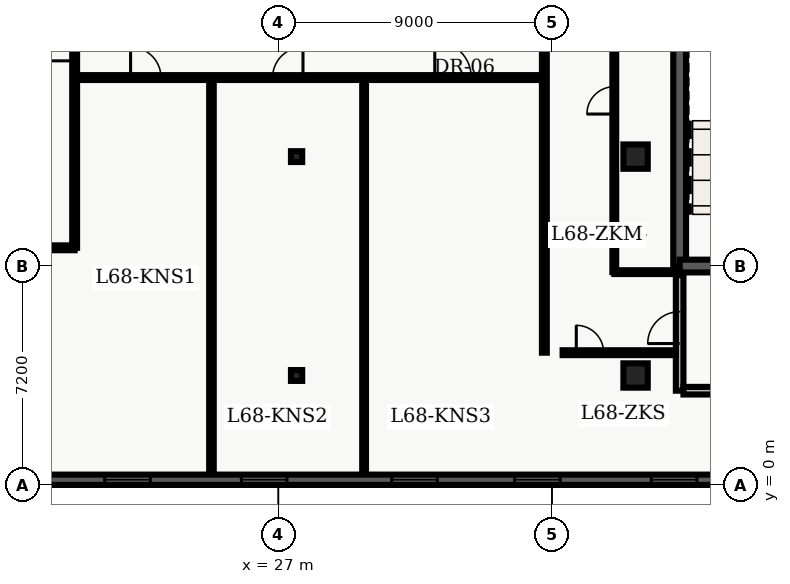
"""IFC4 building model, lengths in metres.
Left out: names, types, materials, properties, quantities, classifications, styles, units other than length and angle.
Written with IfcOpenShell. Run it as: python <this file> out.ifc"""

import sys

from ifc_helpers import new_model, entity, si_unit, converted_unit, direction, frame, origin_with_axes, origin_2d_with_axis, place, context, subcontext, project, spatial, polyline, rectangle, i_section, outline, extrude, element, fill, save


model = new_model("IFC4")
c1 = context("Model", 3, precision=1e-05, world=origin_with_axes(), true_north=direction((0.0, 1.0)))
c2 = subcontext(c1, "Body", "Model", "MODEL_VIEW")
j1 = project(units=[si_unit("LENGTHUNIT", "METRE"), converted_unit("PLANEANGLEUNIT", "DEGREE", entity("IfcPlaneAngleMeasure", 0.017), si_unit("PLANEANGLEUNIT", "RADIAN"), dimensions=[0, 0, 0, 0, 0, 0, 0])], contexts=[c1])
p1 = place(None, origin_with_axes())
s1 = spatial("IfcSite", under=j1, at=p1, CompositionType="ELEMENT")
p2 = place(p1, origin_with_axes())
s2 = spatial("IfcBuilding", under=s1, at=p2, CompositionType="ELEMENT")
p3 = place(p2, frame((0.0, 0.0, 276.3), z_axis=(0.0, 0.0, 1.0), x_axis=(1.0, 0.0, 0.0)))
s3 = spatial("IfcBuildingStorey", under=s2, at=p3, CompositionType="ELEMENT", Elevation=276.3)
p4 = place(p3, frame((40.2, 7.2, 0.0), z_axis=(0.0, 0.0, 1.0), x_axis=(0.0, 1.0, 0.0)))
e1 = element("IfcWall", 1, at=p4, inside=s3, PredefinedType="SHEAR", context=c2, shape_type="SweptSolid", body=[
    extrude(outline(polyline([(0.0, -0.21), (15.6, -0.21), (15.6, 0.21), (0.0, 0.21), (0.0, -0.21)])), origin_with_axes(), (0.0, 0.0, 1.0), 3.66),
])
p5 = place(p4, frame((12.75, 0.0, 0.0), z_axis=(0.0, 0.0, 1.0), x_axis=(1.0, 0.0, 0.0)))
e2 = element("IfcOpeningElement", 2, at=p5, cuts=e1, PredefinedType="OPENING", context=c2, shape_type="SweptSolid", body=[
    extrude(rectangle(XDim=1.2, YDim=0.44, at=origin_2d_with_axis()), origin_with_axes(), (0.0, 0.0, 1.0), 2.15),
])
p6 = place(p4, frame((9.3, 0.0, 0.0), z_axis=(0.0, 0.0, 1.0), x_axis=(1.0, 0.0, 0.0)))
e3 = element("IfcOpeningElement", 3, at=p6, cuts=e1, PredefinedType="OPENING", context=c2, shape_type="SweptSolid", body=[
    extrude(rectangle(XDim=0.9, YDim=0.44, at=origin_2d_with_axis()), origin_with_axes(), (0.0, 0.0, 1.0), 2.15),
])
p7 = place(p3, frame((40.2, 7.2, 0.0), z_axis=(0.0, 0.0, 1.0), x_axis=(1.0, 0.0, 0.0)))
e4 = element("IfcWall", 4, at=p7, inside=s3, PredefinedType="SHEAR", context=c2, shape_type="SweptSolid", body=[
    extrude(outline(polyline([(0.0, -0.21), (7.85, -0.21), (7.85, 0.21), (0.0, 0.21), (0.0, -0.21)])), origin_with_axes(), (0.0, 0.0, 1.0), 3.66),
])
p8 = place(p7, frame((2.175, 0.0, 0.0), z_axis=(0.0, 0.0, 1.0), x_axis=(1.0, 0.0, 0.0)))
e5 = element("IfcOpeningElement", 5, at=p8, cuts=e4, PredefinedType="OPENING", context=c2, shape_type="SweptSolid", body=[
    extrude(rectangle(XDim=1.05, YDim=0.44, at=origin_2d_with_axis()), origin_with_axes(), (0.0, 0.0, 1.0), 2.15),
])
p9 = place(p3, frame((40.2, 3.1, 0.0), z_axis=(0.0, 0.0, 1.0), x_axis=(0.0, 1.0, 0.0)))
e6 = element("IfcWall", 6, at=p9, inside=s3, PredefinedType="SOLIDWALL", context=c2, shape_type="SweptSolid", body=[
    extrude(outline(polyline([(0.0, -0.125), (3.8, -0.125), (3.8, 0.125), (0.0, 0.125), (0.0, -0.125)])), origin_with_axes(), (0.0, 0.0, 1.0), 2.7),
])
p10 = place(p9, frame((2.075, 0.0, 0.0), z_axis=(0.0, 0.0, 1.0), x_axis=(1.0, 0.0, 0.0)))
e7 = element("IfcOpeningElement", 7, at=p10, cuts=e6, PredefinedType="OPENING", context=c2, shape_type="SweptSolid", body=[
    extrude(rectangle(XDim=1.05, YDim=0.27, at=origin_2d_with_axis()), origin_with_axes(), (0.0, 0.0, 1.0), 2.15),
])
p11 = place(p3, frame((40.325, 3.1, 0.0), z_axis=(0.0, 0.0, 1.0), x_axis=(1.0, 0.0, 0.0)))
e8 = element("IfcWall", 8, at=p11, inside=s3, PredefinedType="SOLIDWALL", context=c2, shape_type="SweptSolid", body=[
    extrude(outline(polyline([(0.0, -0.125), (3.95, -0.125), (3.95, 0.125), (0.0, 0.125), (0.0, -0.125)])), origin_with_axes(), (0.0, 0.0, 1.0), 2.7),
])
for number, where, z_axis, x_axis in (
    (9, (27.6, 3.6, 0.0), (0.0, 0.0, 1.0), (1.0, 0.0, 0.0)),
    (10, (27.6, 10.8, 0.0), (0.0, 0.0, 1.0), (1.0, 0.0, 0.0)),
):
    element("IfcColumn", number, at=place(p3, frame(where, z_axis=z_axis, x_axis=x_axis)), inside=s3, PredefinedType="COLUMN", context=c2, shape_type="SweptSolid", body=[
        extrude(i_section(OverallWidth=0.369, OverallDepth=0.356, WebThickness=0.011, FlangeThickness=0.018, FilletRadius=0.018, at=origin_2d_with_axis()), origin_with_axes(), (0.0, 0.0, 1.0), 3.9),
    ])
for number, where, z_axis, x_axis in (
    (11, (38.75, 3.6, 0.0), (0.0, 0.0, 1.0), (1.0, 0.0, 0.0)),
    (12, (38.75, 10.8, 0.0), (0.0, 0.0, 1.0), (1.0, 0.0, 0.0)),
):
    element("IfcColumn", number, at=place(p3, frame(where, z_axis=z_axis, x_axis=x_axis)), inside=s3, PredefinedType="COLUMN", context=c2, shape_type="SweptSolid", body=[
        extrude(rectangle(XDim=0.8, YDim=0.8, at=origin_2d_with_axis()), origin_with_axes(), (0.0, 0.0, 1.0), 3.9),
    ])
p12 = place(p3, frame((8.135, 7.8, 0.0), z_axis=(0.0, 0.0, 1.0), x_axis=(1.0, 0.0, 0.0)))
e13 = element("IfcWall", 13, at=p12, inside=s3, PredefinedType="PARTITIONING", context=c2, shape_type="SweptSolid", body=[
    extrude(outline(polyline([(0.0, -0.08), (12.165, -0.08), (12.165, 0.08), (0.0, 0.08), (0.0, -0.08)])), origin_with_axes(), (0.0, 0.0, 1.0), 2.7),
])
p13 = place(p12, frame((6.065, 0.0, 0.0), z_axis=(0.0, 0.0, 1.0), x_axis=(1.0, 0.0, 0.0)))
e14 = element("IfcOpeningElement", 14, at=p13, cuts=e13, PredefinedType="OPENING", context=c2, shape_type="SweptSolid", body=[
    extrude(rectangle(XDim=1.0, YDim=0.18, at=origin_2d_with_axis()), origin_with_axes(), (0.0, 0.0, 1.0), 2.15),
])
p14 = place(p3, frame((20.3, 7.8, 0.0), z_axis=(0.0, 0.0, 1.0), x_axis=(0.0, 1.0, 0.0)))
e15 = element("IfcWall", 15, at=p14, inside=s3, PredefinedType="PARTITIONING", context=c2, shape_type="SweptSolid", body=[
    extrude(outline(polyline([(0.0, -0.08), (32.7, -0.08), (32.7, 0.08), (0.0, 0.08), (0.0, -0.08)])), origin_with_axes(), (0.0, 0.0, 1.0), 2.7),
])
p15 = place(p14, frame((14.392, 0.0, 0.0), z_axis=(0.0, 0.0, 1.0), x_axis=(1.0, 0.0, 0.0)))
e16 = element("IfcOpeningElement", 16, at=p15, cuts=e15, PredefinedType="OPENING", context=c2, shape_type="SweptSolid", body=[
    extrude(rectangle(XDim=1.0, YDim=0.18, at=origin_2d_with_axis()), origin_with_axes(), (0.0, 0.0, 1.0), 2.15),
])
p16 = place(p14, frame((18.846, 0.0, 0.0), z_axis=(0.0, 0.0, 1.0), x_axis=(1.0, 0.0, 0.0)))
e17 = element("IfcOpeningElement", 17, at=p16, cuts=e15, PredefinedType="OPENING", context=c2, shape_type="SweptSolid", body=[
    extrude(rectangle(XDim=1.0, YDim=0.18, at=origin_2d_with_axis()), origin_with_axes(), (0.0, 0.0, 1.0), 2.15),
])
p17 = place(p14, frame((23.952, 0.0, 0.0), z_axis=(0.0, 0.0, 1.0), x_axis=(1.0, 0.0, 0.0)))
e18 = element("IfcOpeningElement", 18, at=p17, cuts=e15, PredefinedType="OPENING", context=c2, shape_type="SweptSolid", body=[
    extrude(rectangle(XDim=1.0, YDim=0.18, at=origin_2d_with_axis()), origin_with_axes(), (0.0, 0.0, 1.0), 2.15),
])
p18 = place(p14, frame((27.114, 0.0, 0.0), z_axis=(0.0, 0.0, 1.0), x_axis=(1.0, 0.0, 0.0)))
e19 = element("IfcOpeningElement", 19, at=p18, cuts=e15, PredefinedType="OPENING", context=c2, shape_type="SweptSolid", body=[
    extrude(rectangle(XDim=1.0, YDim=0.18, at=origin_2d_with_axis()), origin_with_axes(), (0.0, 0.0, 1.0), 2.15),
])
p19 = place(p14, frame((6.675, 0.0, 0.0), z_axis=(0.0, 0.0, 1.0), x_axis=(1.0, 0.0, 0.0)))
e20 = element("IfcOpeningElement", 20, at=p19, cuts=e15, PredefinedType="OPENING", context=c2, shape_type="SweptSolid", body=[
    extrude(rectangle(XDim=1.05, YDim=0.18, at=origin_2d_with_axis()), origin_with_axes(), (0.0, 0.0, 1.0), 2.15),
])
p20 = place(p3, frame((20.3, 13.4, 0.0), z_axis=(0.0, 0.0, 1.0), x_axis=(1.0, 0.0, 0.0)))
e21 = element("IfcWall", 21, at=p20, inside=s3, PredefinedType="PARTITIONING", context=c2, shape_type="SweptSolid", body=[
    extrude(outline(polyline([(0.0, -0.08), (15.45, -0.08), (15.45, 0.08), (0.0, 0.08), (0.0, -0.08)])), origin_with_axes(), (0.0, 0.0, 1.0), 2.7),
])
p21 = place(p20, frame((2.34, 0.0, 0.0), z_axis=(0.0, 0.0, 1.0), x_axis=(1.0, 0.0, 0.0)))
e22 = element("IfcOpeningElement", 22, at=p21, cuts=e21, PredefinedType="OPENING", context=c2, shape_type="SweptSolid", body=[
    extrude(rectangle(XDim=1.0, YDim=0.18, at=origin_2d_with_axis()), origin_with_axes(), (0.0, 0.0, 1.0), 2.15),
])
p22 = place(p20, frame((7.011, 0.0, 0.0), z_axis=(0.0, 0.0, 1.0), x_axis=(1.0, 0.0, 0.0)))
e23 = element("IfcOpeningElement", 23, at=p22, cuts=e21, PredefinedType="OPENING", context=c2, shape_type="SweptSolid", body=[
    extrude(rectangle(XDim=1.0, YDim=0.18, at=origin_2d_with_axis()), origin_with_axes(), (0.0, 0.0, 1.0), 2.15),
])
p23 = place(p20, frame((12.445, 0.0, 0.0), z_axis=(0.0, 0.0, 1.0), x_axis=(1.0, 0.0, 0.0)))
e24 = element("IfcOpeningElement", 24, at=p23, cuts=e21, PredefinedType="OPENING", context=c2, shape_type="SweptSolid", body=[
    extrude(rectangle(XDim=1.2, YDim=0.18, at=origin_2d_with_axis()), origin_with_axes(), (0.0, 0.0, 1.0), 2.2),
])
p24 = place(p3, frame((35.75, 4.35, 0.0), z_axis=(0.0, 0.0, 1.0), x_axis=(0.0, 1.0, 0.0)))
e25 = element("IfcWall", 25, at=p24, inside=s3, PredefinedType="PARTITIONING", context=c2, shape_type="SweptSolid", body=[
    extrude(outline(polyline([(0.0, -0.08), (16.95, -0.08), (16.95, 0.08), (0.0, 0.08), (0.0, -0.08)])), origin_with_axes(), (0.0, 0.0, 1.0), 2.7),
])
p25 = place(p3, frame((24.8, 0.335, 0.0), z_axis=(0.0, 0.0, 1.0), x_axis=(0.0, 1.0, 0.0)))
e26 = element("IfcWall", 26, at=p25, inside=s3, PredefinedType="PARTITIONING", context=c2, shape_type="SweptSolid", body=[
    extrude(outline(polyline([(0.0, -0.075), (12.945, -0.075), (12.945, 0.075), (0.0, 0.075), (0.0, -0.075)])), origin_with_axes(), (0.0, 0.0, 1.0), 2.7),
])
p26 = place(p3, frame((29.821, 0.335, 0.0), z_axis=(0.0, 0.0, 1.0), x_axis=(0.0, 1.0, 0.0)))
e27 = element("IfcWall", 27, at=p26, inside=s3, PredefinedType="PARTITIONING", context=c2, shape_type="SweptSolid", body=[
    extrude(outline(polyline([(0.0, -0.062), (12.945, -0.062), (12.945, 0.062), (0.0, 0.062), (0.0, -0.062)])), origin_with_axes(), (0.0, 0.0, 1.0), 2.7),
])
p27 = place(p3, frame((36.35, 4.35, 0.0), z_axis=(0.0, 0.0, 1.0), x_axis=(1.0, 0.0, 0.0)))
e28 = element("IfcWall", 28, at=p27, inside=s3, PredefinedType="PARTITIONING", context=c2, shape_type="SweptSolid", body=[
    extrude(outline(polyline([(0.0, -0.08), (3.725, -0.08), (3.725, 0.08), (0.0, 0.08), (0.0, -0.08)])), origin_with_axes(), (0.0, 0.0, 1.0), 2.7),
])
p28 = place(p27, frame((0.9, 0.0, 0.0), z_axis=(0.0, 0.0, 1.0), x_axis=(1.0, 0.0, 0.0)))
e29 = element("IfcOpeningElement", 29, at=p28, cuts=e28, PredefinedType="OPENING", context=c2, shape_type="SweptSolid", body=[
    extrude(rectangle(XDim=0.9, YDim=0.18, at=origin_2d_with_axis()), origin_with_axes(), (0.0, 0.0, 1.0), 2.15),
])
p29 = place(p3, frame((38.05, 7.0, 0.0), z_axis=(0.0, 0.0, 1.0), x_axis=(1.0, 0.0, 0.0)))
e30 = element("IfcWall", 30, at=p29, inside=s3, PredefinedType="PARTITIONING", context=c2, shape_type="SweptSolid", body=[
    extrude(outline(polyline([(0.0, -0.062), (2.15, -0.062), (2.15, 0.062), (0.0, 0.062), (0.0, -0.062)])), origin_with_axes(), (0.0, 0.0, 1.0), 2.7),
])
p30 = place(p3, frame((38.05, 7.0, 0.0), z_axis=(0.0, 0.0, 1.0), x_axis=(0.0, 1.0, 0.0)))
e31 = element("IfcWall", 31, at=p30, inside=s3, PredefinedType="PARTITIONING", context=c2, shape_type="SweptSolid", body=[
    extrude(outline(polyline([(0.0, -0.062), (7.95, -0.062), (7.95, 0.062), (0.0, 0.062), (0.0, -0.062)])), origin_with_axes(), (0.0, 0.0, 1.0), 2.7),
])
p31 = place(p30, frame((5.65, 0.0, 0.0), z_axis=(0.0, 0.0, 1.0), x_axis=(1.0, 0.0, 0.0)))
e32 = element("IfcOpeningElement", 32, at=p31, cuts=e31, PredefinedType="OPENING", context=c2, shape_type="SweptSolid", body=[
    extrude(rectangle(XDim=0.9, YDim=0.145, at=origin_2d_with_axis()), origin_with_axes(), (0.0, 0.0, 1.0), 2.15),
])
p32 = place(p3, frame((47.36, 0.17, 0.0), z_axis=(0.0, 0.0, 1.0), x_axis=(-1.0, 0.0, 0.0)))
e33 = element("IfcWall", 33, at=p32, inside=s3, PredefinedType="SOLIDWALL", context=c2, shape_type="SweptSolid", body=[
    extrude(outline(polyline([(0.0, -0.17), (37.16, -0.17), (37.16, 0.17), (0.0, 0.17), (0.0, -0.17)])), origin_with_axes(), (0.0, 0.0, 1.0), 3.66),
])
p33 = place(p32, frame((2.847, 0.0, 0.45), z_axis=(0.0, 0.0, 1.0), x_axis=(1.0, 0.0, 0.0)))
e34 = element("IfcOpeningElement", 34, at=p33, cuts=e33, PredefinedType="OPENING", context=c2, shape_type="SweptSolid", body=[
    extrude(rectangle(XDim=1.5, YDim=0.36, at=origin_2d_with_axis()), origin_with_axes(), (0.0, 0.0, 1.0), 2.1),
])
p34 = place(p32, frame((7.342, 0.0, 0.45), z_axis=(0.0, 0.0, 1.0), x_axis=(1.0, 0.0, 0.0)))
e35 = element("IfcOpeningElement", 35, at=p34, cuts=e33, PredefinedType="OPENING", context=c2, shape_type="SweptSolid", body=[
    extrude(rectangle(XDim=1.5, YDim=0.36, at=origin_2d_with_axis()), origin_with_axes(), (0.0, 0.0, 1.0), 2.1),
])
p35 = place(p32, frame((11.837, 0.0, 0.45), z_axis=(0.0, 0.0, 1.0), x_axis=(1.0, 0.0, 0.0)))
e36 = element("IfcOpeningElement", 36, at=p35, cuts=e33, PredefinedType="OPENING", context=c2, shape_type="SweptSolid", body=[
    extrude(rectangle(XDim=1.5, YDim=0.36, at=origin_2d_with_axis()), origin_with_axes(), (0.0, 0.0, 1.0), 2.1),
])
p36 = place(p32, frame((15.882, 0.0, 0.45), z_axis=(0.0, 0.0, 1.0), x_axis=(1.0, 0.0, 0.0)))
e37 = element("IfcOpeningElement", 37, at=p36, cuts=e33, PredefinedType="OPENING", context=c2, shape_type="SweptSolid", body=[
    extrude(rectangle(XDim=1.5, YDim=0.36, at=origin_2d_with_axis()), origin_with_axes(), (0.0, 0.0, 1.0), 2.1),
])
p37 = place(p32, frame((20.827, 0.0, 0.45), z_axis=(0.0, 0.0, 1.0), x_axis=(1.0, 0.0, 0.0)))
e38 = element("IfcOpeningElement", 38, at=p37, cuts=e33, PredefinedType="OPENING", context=c2, shape_type="SweptSolid", body=[
    extrude(rectangle(XDim=1.5, YDim=0.36, at=origin_2d_with_axis()), origin_with_axes(), (0.0, 0.0, 1.0), 2.1),
])
p38 = place(p32, frame((25.322, 0.0, 0.45), z_axis=(0.0, 0.0, 1.0), x_axis=(1.0, 0.0, 0.0)))
e39 = element("IfcOpeningElement", 39, at=p38, cuts=e33, PredefinedType="OPENING", context=c2, shape_type="SweptSolid", body=[
    extrude(rectangle(XDim=1.5, YDim=0.36, at=origin_2d_with_axis()), origin_with_axes(), (0.0, 0.0, 1.0), 2.1),
])
p39 = place(p32, frame((29.817, 0.0, 0.45), z_axis=(0.0, 0.0, 1.0), x_axis=(1.0, 0.0, 0.0)))
e40 = element("IfcOpeningElement", 40, at=p39, cuts=e33, PredefinedType="OPENING", context=c2, shape_type="SweptSolid", body=[
    extrude(rectangle(XDim=1.5, YDim=0.36, at=origin_2d_with_axis()), origin_with_axes(), (0.0, 0.0, 1.0), 2.1),
])
p40 = place(p32, frame((34.312, 0.0, 0.45), z_axis=(0.0, 0.0, 1.0), x_axis=(1.0, 0.0, 0.0)))
e41 = element("IfcOpeningElement", 41, at=p40, cuts=e33, PredefinedType="OPENING", context=c2, shape_type="SweptSolid", body=[
    extrude(rectangle(XDim=1.5, YDim=0.36, at=origin_2d_with_axis()), origin_with_axes(), (0.0, 0.0, 1.0), 2.1),
])
p41 = place(p9, frame((2.075, 0.0, 0.0), z_axis=(0.0, 0.0, 1.0), x_axis=(1.0, 0.0, 0.0)))
e42 = element("IfcDoor", 42, at=p41, inside=s3, OperationType="SINGLE_SWING_LEFT", PredefinedType="DOOR", context=c2, shape_type="SweptSolid", body=[
    extrude(rectangle(XDim=1.05, YDim=0.09, at=origin_2d_with_axis()), origin_with_axes(), (0.0, 0.0, 1.0), 2.15),
])
fill(e7, e42)
p42 = place(p14, frame((6.675, 0.0, 0.0), z_axis=(0.0, 0.0, 1.0), x_axis=(1.0, 0.0, 0.0)))
e43 = element("IfcDoor", 43, at=p42, inside=s3, OperationType="SINGLE_SWING_LEFT", PredefinedType="DOOR", context=c2, shape_type="SweptSolid", body=[
    extrude(rectangle(XDim=1.05, YDim=0.09, at=origin_2d_with_axis()), origin_with_axes(), (0.0, 0.0, 1.0), 2.15),
])
fill(e20, e43)
p43 = place(p20, frame((2.34, 0.0, 0.0), z_axis=(0.0, 0.0, 1.0), x_axis=(1.0, 0.0, 0.0)))
e44 = element("IfcDoor", 44, at=p43, inside=s3, OperationType="SINGLE_SWING_LEFT", PredefinedType="DOOR", context=c2, shape_type="SweptSolid", body=[
    extrude(rectangle(XDim=1.0, YDim=0.09, at=origin_2d_with_axis()), origin_with_axes(), (0.0, 0.0, 1.0), 2.15),
])
fill(e22, e44)
p44 = place(p20, frame((7.011, 0.0, 0.0), z_axis=(0.0, 0.0, 1.0), x_axis=(1.0, 0.0, 0.0)))
e45 = element("IfcDoor", 45, at=p44, inside=s3, OperationType="SINGLE_SWING_RIGHT", PredefinedType="DOOR", context=c2, shape_type="SweptSolid", body=[
    extrude(rectangle(XDim=1.0, YDim=0.09, at=origin_2d_with_axis()), origin_with_axes(), (0.0, 0.0, 1.0), 2.15),
])
fill(e23, e45)
p45 = place(p20, frame((12.445, 0.0, 0.0), z_axis=(0.0, 0.0, 1.0), x_axis=(1.0, 0.0, 0.0)))
e46 = element("IfcDoor", 46, at=p45, inside=s3, OperationType="SINGLE_SWING_LEFT", PredefinedType="DOOR", context=c2, shape_type="SweptSolid", body=[
    extrude(rectangle(XDim=1.2, YDim=0.09, at=origin_2d_with_axis()), origin_with_axes(), (0.0, 0.0, 1.0), 2.2),
])
fill(e24, e46)
p46 = place(p27, frame((0.9, 0.0, 0.0), z_axis=(0.0, 0.0, 1.0), x_axis=(1.0, 0.0, 0.0)))
e47 = element("IfcDoor", 47, at=p46, inside=s3, OperationType="SINGLE_SWING_LEFT", PredefinedType="DOOR", context=c2, shape_type="SweptSolid", body=[
    extrude(rectangle(XDim=0.9, YDim=0.09, at=origin_2d_with_axis()), origin_with_axes(), (0.0, 0.0, 1.0), 2.15),
])
fill(e29, e47)
p47 = place(p30, frame((5.65, 0.0, 0.0), z_axis=(0.0, 0.0, 1.0), x_axis=(1.0, 0.0, 0.0)))
e48 = element("IfcDoor", 48, at=p47, inside=s3, OperationType="SINGLE_SWING_LEFT", PredefinedType="DOOR", context=c2, shape_type="SweptSolid", body=[
    extrude(rectangle(XDim=0.9, YDim=0.075, at=origin_2d_with_axis()), origin_with_axes(), (0.0, 0.0, 1.0), 2.15),
])
fill(e32, e48)
p48 = place(p32, frame((7.342, 0.0, 0.45), z_axis=(0.0, 0.0, 1.0), x_axis=(1.0, 0.0, 0.0)))
e49 = element("IfcWindow", 49, at=p48, inside=s3, PredefinedType="WINDOW", context=c2, shape_type="SweptSolid", body=[
    extrude(rectangle(XDim=1.5, YDim=0.09, at=origin_2d_with_axis()), origin_with_axes(), (0.0, 0.0, 1.0), 2.1),
])
fill(e35, e49)
p49 = place(p32, frame((11.837, 0.0, 0.45), z_axis=(0.0, 0.0, 1.0), x_axis=(1.0, 0.0, 0.0)))
e50 = element("IfcWindow", 50, at=p49, inside=s3, PredefinedType="WINDOW", context=c2, shape_type="SweptSolid", body=[
    extrude(rectangle(XDim=1.5, YDim=0.09, at=origin_2d_with_axis()), origin_with_axes(), (0.0, 0.0, 1.0), 2.1),
])
fill(e36, e50)
p50 = place(p32, frame((15.882, 0.0, 0.45), z_axis=(0.0, 0.0, 1.0), x_axis=(1.0, 0.0, 0.0)))
e51 = element("IfcWindow", 51, at=p50, inside=s3, PredefinedType="WINDOW", context=c2, shape_type="SweptSolid", body=[
    extrude(rectangle(XDim=1.5, YDim=0.09, at=origin_2d_with_axis()), origin_with_axes(), (0.0, 0.0, 1.0), 2.1),
])
fill(e37, e51)
p51 = place(p32, frame((20.827, 0.0, 0.45), z_axis=(0.0, 0.0, 1.0), x_axis=(1.0, 0.0, 0.0)))
e52 = element("IfcWindow", 52, at=p51, inside=s3, PredefinedType="WINDOW", context=c2, shape_type="SweptSolid", body=[
    extrude(rectangle(XDim=1.5, YDim=0.09, at=origin_2d_with_axis()), origin_with_axes(), (0.0, 0.0, 1.0), 2.1),
])
fill(e38, e52)
p52 = place(p32, frame((25.322, 0.0, 0.45), z_axis=(0.0, 0.0, 1.0), x_axis=(1.0, 0.0, 0.0)))
e53 = element("IfcWindow", 53, at=p52, inside=s3, PredefinedType="WINDOW", context=c2, shape_type="SweptSolid", body=[
    extrude(rectangle(XDim=1.5, YDim=0.09, at=origin_2d_with_axis()), origin_with_axes(), (0.0, 0.0, 1.0), 2.1),
])
fill(e39, e53)
save(model, sys.argv[1])
